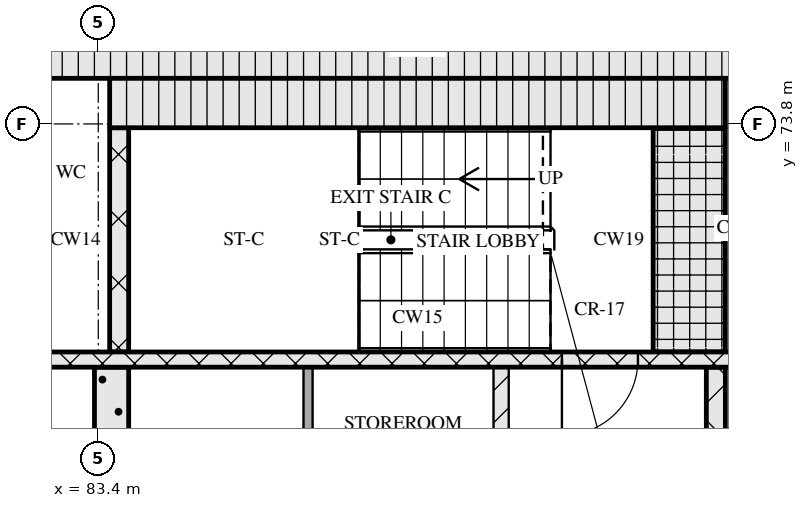
"""IFC4 building model, lengths in metres.
Left out: names, types, materials, properties, quantities, classifications, styles, units other than length and angle.
Written with IfcOpenShell. Run it as: python <this file> out.ifc"""

import sys

from ifc_helpers import new_model, si_unit, direction, frame, frame_2d, origin, place, context, subcontext, project, spatial, rectangle, extrude, element, fill, save


model = new_model("IFC4")
c1 = context("Model", 3, precision=1e-05, world=origin(), true_north=direction((0.0, 1.0)))
c2 = subcontext(c1, "Body", "Model", "MODEL_VIEW")
j1 = project(units=[si_unit("LENGTHUNIT", "METRE"), si_unit("PLANEANGLEUNIT", "RADIAN")], contexts=[c1])
p1 = place(None, origin())
s1 = spatial("IfcSite", under=j1, at=p1, CompositionType="ELEMENT")
p2 = place(p1, origin())
s2 = spatial("IfcBuilding", under=s1, at=p2, CompositionType="ELEMENT")
p3 = place(p2, frame((0.0, 0.0, 209.1)))
s3 = spatial("IfcBuildingStorey", under=s2, at=p3, CompositionType="ELEMENT", Elevation=209.1)
p4 = place(p3, frame((67.15, 74.725, 0.0), z_axis=(0.0, 0.0, 1.0), x_axis=(1.0, 0.0, 0.0)))
e1 = element("IfcWall", 1, at=p4, inside=s3, PredefinedType="SOLIDWALL", context=c2, shape_type="SweptSolid", body=[
    extrude(rectangle(XDim=40.9, YDim=0.65, at=frame_2d((20.45, 0.0))), origin(), (0.0, 0.0, 1.0), 3.32),
])
p5 = place(p3, frame((83.575, 68.0, 0.0), z_axis=(0.0, 0.0, 1.0), x_axis=(0.0, 1.0, 0.0)))
e2 = element("IfcWall", 2, at=p5, inside=s3, PredefinedType="SOLIDWALL", context=c2, shape_type="SweptSolid", body=[
    extrude(rectangle(XDim=2.6, YDim=0.45, at=frame_2d((1.3, 0.0))), origin(), (0.0, 0.0, 1.0), 3.32),
])
p6 = place(p3, frame((86.16, 68.0, 0.0), z_axis=(0.0, 0.0, 1.0), x_axis=(0.0, 1.0, 0.0)))
e3 = element("IfcWall", 3, at=p6, inside=s3, PredefinedType="PARTITIONING", context=c2, shape_type="SweptSolid", body=[
    extrude(rectangle(XDim=2.6, YDim=0.12, at=frame_2d((1.3, 0.0))), origin(), (0.0, 0.0, 1.0), 3.32),
])
p7 = place(p3, frame((88.7, 68.0, 0.0), z_axis=(0.0, 0.0, 1.0), x_axis=(0.0, 1.0, 0.0)))
e4 = element("IfcWall", 4, at=p7, inside=s3, PredefinedType="PARTITIONING", context=c2, shape_type="SweptSolid", body=[
    extrude(rectangle(XDim=2.6, YDim=0.2, at=frame_2d((1.3, 0.0))), origin(), (0.0, 0.0, 1.0), 3.32),
])
p8 = place(p3, frame((91.525, 68.0, 0.0), z_axis=(0.0, 0.0, 1.0), x_axis=(0.0, 1.0, 0.0)))
e5 = element("IfcWall", 5, at=p8, inside=s3, PredefinedType="SOLIDWALL", context=c2, shape_type="SweptSolid", body=[
    extrude(rectangle(XDim=2.6, YDim=0.25, at=frame_2d((1.3, 0.0))), origin(), (0.0, 0.0, 1.0), 3.32),
])
p9 = place(p3, frame((67.8, 70.7, 0.0), z_axis=(0.0, 0.0, 1.0), x_axis=(1.0, 0.0, 0.0)))
e6 = element("IfcWall", 6, at=p9, inside=s3, PredefinedType="SOLIDWALL", context=c2, shape_type="SweptSolid", body=[
    extrude(rectangle(XDim=39.6, YDim=0.2, at=frame_2d((19.8, 0.0))), origin(), (0.0, 0.0, 1.0), 3.32),
])
p10 = place(p9, frame((0.65, 0.0, 0.0)))
e7 = element("IfcOpeningElement", 7, at=p10, cuts=e6, PredefinedType="OPENING", context=c2, shape_type="SweptSolid", body=[
    extrude(rectangle(XDim=1.1, YDim=2.1, at=frame_2d((0.55, 1.05))), frame((0.0, 0.11, 0.0), z_axis=(0.0, -1.0, 0.0), x_axis=(1.0, 0.0, 0.0)), (0.0, 0.0, 1.0), 0.22),
])
p11 = place(p9, frame((3.25, 0.0, 0.0)))
e8 = element("IfcOpeningElement", 8, at=p11, cuts=e6, PredefinedType="OPENING", context=c2, shape_type="SweptSolid", body=[
    extrude(rectangle(XDim=1.1, YDim=2.1, at=frame_2d((0.55, 1.05))), frame((0.0, 0.11, 0.0), z_axis=(0.0, -1.0, 0.0), x_axis=(1.0, 0.0, 0.0)), (0.0, 0.0, 1.0), 0.22),
])
p12 = place(p9, frame((5.9, 0.0, 0.0)))
e9 = element("IfcOpeningElement", 9, at=p12, cuts=e6, PredefinedType="OPENING", context=c2, shape_type="SweptSolid", body=[
    extrude(rectangle(XDim=1.0, YDim=2.1, at=frame_2d((0.5, 1.05))), frame((0.0, 0.11, 0.0), z_axis=(0.0, -1.0, 0.0), x_axis=(1.0, 0.0, 0.0)), (0.0, 0.0, 1.0), 0.22),
])
p13 = place(p9, frame((21.7, 0.0, 0.0)))
e10 = element("IfcOpeningElement", 10, at=p13, cuts=e6, PredefinedType="OPENING", context=c2, shape_type="SweptSolid", body=[
    extrude(rectangle(XDim=1.0, YDim=2.1, at=frame_2d((0.5, 1.05))), frame((0.0, 0.11, 0.0), z_axis=(0.0, -1.0, 0.0), x_axis=(1.0, 0.0, 0.0)), (0.0, 0.0, 1.0), 0.22),
])
p14 = place(p9, frame((32.7, 0.0, 0.0)))
e11 = element("IfcOpeningElement", 11, at=p14, cuts=e6, PredefinedType="OPENING", context=c2, shape_type="SweptSolid", body=[
    extrude(rectangle(XDim=1.0, YDim=2.1, at=frame_2d((0.5, 1.05))), frame((0.0, 0.11, 0.0), z_axis=(0.0, -1.0, 0.0), x_axis=(1.0, 0.0, 0.0)), (0.0, 0.0, 1.0), 0.22),
])
p15 = place(p9, frame((35.25, 0.0, 0.0)))
e12 = element("IfcOpeningElement", 12, at=p15, cuts=e6, PredefinedType="OPENING", context=c2, shape_type="SweptSolid", body=[
    extrude(rectangle(XDim=1.1, YDim=2.1, at=frame_2d((0.55, 1.05))), frame((0.0, 0.11, 0.0), z_axis=(0.0, -1.0, 0.0), x_axis=(1.0, 0.0, 0.0)), (0.0, 0.0, 1.0), 0.22),
])
p16 = place(p9, frame((37.85, 0.0, 0.0)))
e13 = element("IfcOpeningElement", 13, at=p16, cuts=e6, PredefinedType="OPENING", context=c2, shape_type="SweptSolid", body=[
    extrude(rectangle(XDim=1.1, YDim=2.1, at=frame_2d((0.55, 1.05))), frame((0.0, 0.11, 0.0), z_axis=(0.0, -1.0, 0.0), x_axis=(1.0, 0.0, 0.0)), (0.0, 0.0, 1.0), 0.22),
])
p17 = place(p3, frame((83.675, 70.8, 0.0), z_axis=(0.0, 0.0, 1.0), x_axis=(0.0, 1.0, 0.0)))
e14 = element("IfcWall", 14, at=p17, inside=s3, PredefinedType="SOLIDWALL", context=c2, shape_type="SweptSolid", body=[
    extrude(rectangle(XDim=2.95, YDim=0.25, at=frame_2d((1.475, 0.0))), origin(), (0.0, 0.0, 1.0), 3.32),
])
p18 = place(p3, frame((91.175, 70.8, 0.0), z_axis=(0.0, 0.0, 1.0), x_axis=(0.0, 1.0, 0.0)))
e15 = element("IfcWall", 15, at=p18, inside=s3, PredefinedType="SOLIDWALL", context=c2, shape_type="SweptSolid", body=[
    extrude(rectangle(XDim=2.95, YDim=0.95, at=frame_2d((1.475, 0.0))), origin(), (0.0, 0.0, 1.0), 3.32),
])
p19 = place(p3, frame((83.55, 74.075, 0.0), z_axis=(0.0, 0.0, 1.0), x_axis=(1.0, 0.0, 0.0)))
e16 = element("IfcWall", 16, at=p19, inside=s3, PredefinedType="SOLIDWALL", context=c2, shape_type="SweptSolid", body=[
    extrude(rectangle(XDim=8.1, YDim=0.65, at=frame_2d((4.05, 0.0))), origin(), (0.0, 0.0, 1.0), 3.32),
])
p20 = place(p13, origin())
e17 = element("IfcDoor", 17, at=p20, inside=s3, OperationType="SINGLE_SWING_RIGHT", PredefinedType="DOOR", context=c2, shape_type="SweptSolid", body=[
    extrude(rectangle(XDim=1.0, YDim=2.1, at=frame_2d((0.5, 1.05))), frame((0.0, 0.025, 0.0), z_axis=(0.0, -1.0, 0.0), x_axis=(1.0, 0.0, 0.0)), (0.0, 0.0, 1.0), 0.05),
])
fill(e10, e17)
save(model, sys.argv[1])
